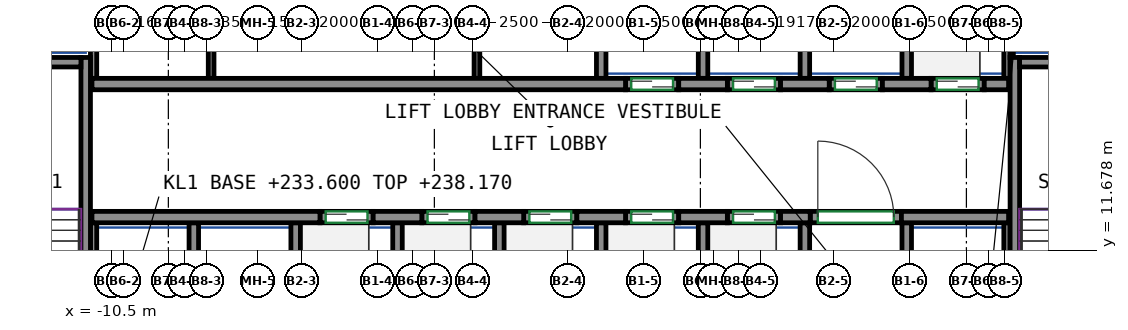
"""IFC4 building model, lengths in metres.
Left out: names, types, materials, properties, quantities, classifications, styles, units other than length and angle.
Written with IfcOpenShell. Run it as: python <this file> out.ifc"""

import sys

from ifc_helpers import new_model, si_unit, direction, frame, frame_2d, origin, place, context, subcontext, project, spatial, rectangle, extrude, source, transform, mapped, element, fill, save


model = new_model("IFC4")
c1 = context("Model", 3, precision=1e-05, world=origin(), true_north=direction((0.0, 1.0)))
c2 = subcontext(c1, "Body", "Model", "MODEL_VIEW")
j1 = project(units=[si_unit("LENGTHUNIT", "METRE"), si_unit("PLANEANGLEUNIT", "RADIAN")], contexts=[c1])
p1 = place(None, origin())
s1 = spatial("IfcSite", under=j1, at=p1, CompositionType="ELEMENT")
p2 = place(p1, origin())
s2 = spatial("IfcBuilding", under=s1, at=p2, CompositionType="ELEMENT")
p3 = place(p2, frame((0.0, 0.0, 233.6)))
s3 = spatial("IfcBuildingStorey", under=s2, at=p3, CompositionType="ELEMENT", Elevation=233.6)
m1 = source(origin(), c2, "Body", "SweptSolid", [
    extrude(rectangle(XDim=7.75, YDim=0.25, at=frame_2d((3.875, 0.0))), origin(), (0.0, 0.0, 1.0), 5.12),
])
p4 = place(p3, frame((-11.175, 9.0, 0.0), z_axis=(0.0, 0.0, 1.0), x_axis=(0.0, 1.0, 0.0)))
e1 = element("IfcWall", 1, at=p4, inside=s3, PredefinedType="SHEAR", context=c2, shape_type="MappedRepresentation", body=[
    mapped(m1, transform((0.0, 0.0, 0.0))),
])
m2 = source(origin(), c2, "Body", "SweptSolid", [
    extrude(rectangle(XDim=3.7, YDim=0.25, at=frame_2d((1.85, 0.0))), origin(), (0.0, 0.0, 1.0), 5.12),
])
p5 = place(p3, frame((-15.0, 16.625, 0.0), z_axis=(0.0, 0.0, 1.0), x_axis=(1.0, 0.0, 0.0)))
e2 = element("IfcWall", 2, at=p5, inside=s3, PredefinedType="SHEAR", context=c2, shape_type="MappedRepresentation", body=[
    mapped(m2, transform((0.0, 0.0, 0.0))),
])
p6 = place(p3, frame((13.275, 9.0, 0.0), z_axis=(0.0, 0.0, 1.0), x_axis=(0.0, 1.0, 0.0)))
e3 = element("IfcWall", 3, at=p6, inside=s3, PredefinedType="SHEAR", context=c2, shape_type="MappedRepresentation", body=[
    mapped(m1, transform((0.0, 0.0, 0.0))),
])
m3 = source(origin(), c2, "Body", "SweptSolid", [
    extrude(rectangle(XDim=3.7, YDim=0.25, at=frame_2d((1.85, 0.0))), origin(), (0.0, 0.0, 1.0), 5.12),
])
p7 = place(p3, frame((13.4, 16.625, 0.0), z_axis=(0.0, 0.0, 1.0), x_axis=(1.0, 0.0, 0.0)))
e4 = element("IfcWall", 4, at=p7, inside=s3, PredefinedType="SHEAR", context=c2, shape_type="MappedRepresentation", body=[
    mapped(m3, transform((0.0, 0.0, 0.0))),
])
m4 = source(origin(), c2, "Body", "SweptSolid", [
    extrude(rectangle(XDim=6.0, YDim=0.3, at=frame_2d((3.0, 0.0))), origin(), (0.0, 0.0, 1.0), 5.12),
])
p8 = place(p3, frame((-11.01, 12.55, 0.0), z_axis=(0.0, 0.0, 1.0), x_axis=(1.0, 0.0, 0.0)))
e5 = element("IfcWall", 5, at=p8, inside=s3, PredefinedType="SHEAR", context=c2, shape_type="MappedRepresentation", body=[
    mapped(m4, transform((0.0, 0.0, 0.0))),
])
m5 = source(origin(), c2, "Body", "SweptSolid", [
    extrude(rectangle(XDim=1.28, YDim=0.3, at=frame_2d((0.64, 0.0))), origin(), (0.0, 0.0, 1.0), 5.12),
])
for number, where, z_axis, x_axis in (
    (6, (-3.61, 12.55, 0.0), (0.0, 0.0, 1.0), (1.0, 0.0, 0.0)),
    (7, (-0.93, 12.55, 0.0), (0.0, 0.0, 1.0), (1.0, 0.0, 0.0)),
    (8, (1.75, 12.55, 0.0), (0.0, 0.0, 1.0), (1.0, 0.0, 0.0)),
    (9, (4.43, 12.55, 0.0), (0.0, 0.0, 1.0), (1.0, 0.0, 0.0)),
):
    element("IfcWall", number, at=place(p3, frame(where, z_axis=z_axis, x_axis=x_axis)), inside=s3, PredefinedType="SHEAR", context=c2, shape_type="MappedRepresentation", body=[
        mapped(m5, transform((0.0, 0.0, 0.0))),
    ])
m6 = source(origin(), c2, "Body", "SweptSolid", [
    extrude(rectangle(XDim=0.78, YDim=0.3, at=frame_2d((0.39, 0.0))), origin(), (0.0, 0.0, 1.0), 5.12),
])
p9 = place(p3, frame((7.11, 12.55, 0.0), z_axis=(0.0, 0.0, 1.0), x_axis=(1.0, 0.0, 0.0)))
e10 = element("IfcWall", 10, at=p9, inside=s3, PredefinedType="SHEAR", context=c2, shape_type="MappedRepresentation", body=[
    mapped(m6, transform((0.0, 0.0, 0.0))),
])
m7 = source(origin(), c2, "Body", "SweptSolid", [
    extrude(rectangle(XDim=2.82, YDim=0.3, at=frame_2d((1.41, 0.0))), origin(), (0.0, 0.0, 1.0), 5.12),
])
p10 = place(p3, frame((10.29, 12.55, 0.0), z_axis=(0.0, 0.0, 1.0), x_axis=(1.0, 0.0, 0.0)))
e11 = element("IfcWall", 11, at=p10, inside=s3, PredefinedType="SHEAR", context=c2, shape_type="MappedRepresentation", body=[
    mapped(m7, transform((0.0, 0.0, 0.0))),
])
m8 = source(origin(), c2, "Body", "SweptSolid", [
    extrude(rectangle(XDim=14.04, YDim=0.3, at=frame_2d((7.02, 0.0))), origin(), (0.0, 0.0, 1.0), 5.12),
])
p11 = place(p3, frame((-11.01, 16.05, 0.0), z_axis=(0.0, 0.0, 1.0), x_axis=(1.0, 0.0, 0.0)))
e12 = element("IfcWall", 12, at=p11, inside=s3, PredefinedType="SHEAR", context=c2, shape_type="MappedRepresentation", body=[
    mapped(m8, transform((0.0, 0.0, 0.0))),
])
p12 = place(p3, frame((4.43, 16.05, 0.0), z_axis=(0.0, 0.0, 1.0), x_axis=(1.0, 0.0, 0.0)))
e13 = element("IfcWall", 13, at=p12, inside=s3, PredefinedType="SHEAR", context=c2, shape_type="MappedRepresentation", body=[
    mapped(m5, transform((0.0, 0.0, 0.0))),
])
m9 = source(origin(), c2, "Body", "SweptSolid", [
    extrude(rectangle(XDim=1.28, YDim=0.3, at=frame_2d((0.64, 0.0))), origin(), (0.0, 0.0, 1.0), 5.12),
])
p13 = place(p3, frame((7.11, 16.05, 0.0), z_axis=(0.0, 0.0, 1.0), x_axis=(1.0, 0.0, 0.0)))
e14 = element("IfcWall", 14, at=p13, inside=s3, PredefinedType="SHEAR", context=c2, shape_type="MappedRepresentation", body=[
    mapped(m9, transform((0.0, 0.0, 0.0))),
])
p14 = place(p3, frame((9.79, 16.05, 0.0), z_axis=(0.0, 0.0, 1.0), x_axis=(1.0, 0.0, 0.0)))
e15 = element("IfcWall", 15, at=p14, inside=s3, PredefinedType="SHEAR", context=c2, shape_type="MappedRepresentation", body=[
    mapped(m5, transform((0.0, 0.0, 0.0))),
])
m10 = source(origin(), c2, "Body", "SweptSolid", [
    extrude(rectangle(XDim=0.64, YDim=0.3, at=frame_2d((0.32, 0.0))), origin(), (0.0, 0.0, 1.0), 5.12),
])
p15 = place(p3, frame((12.47, 16.05, 0.0), z_axis=(0.0, 0.0, 1.0), x_axis=(1.0, 0.0, 0.0)))
e16 = element("IfcWall", 16, at=p15, inside=s3, PredefinedType="SHEAR", context=c2, shape_type="MappedRepresentation", body=[
    mapped(m10, transform((0.0, 0.0, 0.0))),
])
m11 = source(origin(), c2, "Body", "SweptSolid", [
    extrude(rectangle(XDim=1.4, YDim=0.3, at=frame_2d((0.7, 0.0))), origin(), (0.0, 0.0, 1.0), 5.12),
])
p16 = place(p3, frame((-5.01, 12.55, 0.0), z_axis=(0.0, 0.0, 1.0), x_axis=(1.0, 0.0, 0.0)))
e17 = element("IfcWall", 17, at=p16, inside=s3, PredefinedType="PARTITIONING", context=c2, shape_type="MappedRepresentation", body=[
    mapped(m11, transform((0.0, 0.0, 0.0))),
])
p17 = place(p16, frame((0.15, 0.0, 0.0)))
e18 = element("IfcOpeningElement", 18, at=p17, cuts=e17, PredefinedType="OPENING", context=c2, shape_type="SweptSolid", body=[
    extrude(rectangle(XDim=1.1, YDim=2.1, at=frame_2d((0.55, 1.05))), frame((0.0, 0.16, 0.0), z_axis=(0.0, -1.0, 0.0), x_axis=(1.0, 0.0, 0.0)), (0.0, 0.0, 1.0), 0.32),
])
m12 = source(origin(), c2, "Body", "SweptSolid", [
    extrude(rectangle(XDim=1.4, YDim=0.3, at=frame_2d((0.7, 0.0))), origin(), (0.0, 0.0, 1.0), 5.12),
])
p18 = place(p3, frame((-2.33, 12.55, 0.0), z_axis=(0.0, 0.0, 1.0), x_axis=(1.0, 0.0, 0.0)))
e19 = element("IfcWall", 19, at=p18, inside=s3, PredefinedType="PARTITIONING", context=c2, shape_type="MappedRepresentation", body=[
    mapped(m12, transform((0.0, 0.0, 0.0))),
])
p19 = place(p18, frame((0.15, 0.0, 0.0)))
e20 = element("IfcOpeningElement", 20, at=p19, cuts=e19, PredefinedType="OPENING", context=c2, shape_type="SweptSolid", body=[
    extrude(rectangle(XDim=1.1, YDim=2.1, at=frame_2d((0.55, 1.05))), frame((0.0, 0.16, 0.0), z_axis=(0.0, -1.0, 0.0), x_axis=(1.0, 0.0, 0.0)), (0.0, 0.0, 1.0), 0.32),
])
p20 = place(p3, frame((0.35, 12.55, 0.0), z_axis=(0.0, 0.0, 1.0), x_axis=(1.0, 0.0, 0.0)))
e21 = element("IfcWall", 21, at=p20, inside=s3, PredefinedType="PARTITIONING", context=c2, shape_type="MappedRepresentation", body=[
    mapped(m11, transform((0.0, 0.0, 0.0))),
])
p21 = place(p20, frame((0.15, 0.0, 0.0)))
e22 = element("IfcOpeningElement", 22, at=p21, cuts=e21, PredefinedType="OPENING", context=c2, shape_type="SweptSolid", body=[
    extrude(rectangle(XDim=1.1, YDim=2.1, at=frame_2d((0.55, 1.05))), frame((0.0, 0.16, 0.0), z_axis=(0.0, -1.0, 0.0), x_axis=(1.0, 0.0, 0.0)), (0.0, 0.0, 1.0), 0.32),
])
p22 = place(p3, frame((3.03, 12.55, 0.0), z_axis=(0.0, 0.0, 1.0), x_axis=(1.0, 0.0, 0.0)))
e23 = element("IfcWall", 23, at=p22, inside=s3, PredefinedType="PARTITIONING", context=c2, shape_type="MappedRepresentation", body=[
    mapped(m11, transform((0.0, 0.0, 0.0))),
])
p23 = place(p22, frame((0.15, 0.0, 0.0)))
e24 = element("IfcOpeningElement", 24, at=p23, cuts=e23, PredefinedType="OPENING", context=c2, shape_type="SweptSolid", body=[
    extrude(rectangle(XDim=1.1, YDim=2.1, at=frame_2d((0.55, 1.05))), frame((0.0, 0.16, 0.0), z_axis=(0.0, -1.0, 0.0), x_axis=(1.0, 0.0, 0.0)), (0.0, 0.0, 1.0), 0.32),
])
p24 = place(p3, frame((5.71, 12.55, 0.0), z_axis=(0.0, 0.0, 1.0), x_axis=(1.0, 0.0, 0.0)))
e25 = element("IfcWall", 25, at=p24, inside=s3, PredefinedType="PARTITIONING", context=c2, shape_type="MappedRepresentation", body=[
    mapped(m12, transform((0.0, 0.0, 0.0))),
])
p25 = place(p24, frame((0.15, 0.0, 0.0)))
e26 = element("IfcOpeningElement", 26, at=p25, cuts=e25, PredefinedType="OPENING", context=c2, shape_type="SweptSolid", body=[
    extrude(rectangle(XDim=1.1, YDim=2.1, at=frame_2d((0.55, 1.05))), frame((0.0, 0.16, 0.0), z_axis=(0.0, -1.0, 0.0), x_axis=(1.0, 0.0, 0.0)), (0.0, 0.0, 1.0), 0.32),
])
p26 = place(p3, frame((11.07, 16.05, 0.0), z_axis=(0.0, 0.0, 1.0), x_axis=(1.0, 0.0, 0.0)))
e27 = element("IfcWall", 27, at=p26, inside=s3, PredefinedType="PARTITIONING", context=c2, shape_type="MappedRepresentation", body=[
    mapped(m11, transform((0.0, 0.0, 0.0))),
])
p27 = place(p26, frame((0.15, 0.0, 0.0)))
e28 = element("IfcOpeningElement", 28, at=p27, cuts=e27, PredefinedType="OPENING", context=c2, shape_type="SweptSolid", body=[
    extrude(rectangle(XDim=1.1, YDim=2.1, at=frame_2d((0.55, 1.05))), frame((0.0, 0.16, 0.0), z_axis=(0.0, -1.0, 0.0), x_axis=(1.0, 0.0, 0.0)), (0.0, 0.0, 1.0), 0.32),
])
m13 = source(origin(), c2, "Body", "SweptSolid", [
    extrude(rectangle(XDim=2.4, YDim=0.3, at=frame_2d((1.2, 0.0))), origin(), (0.0, 0.0, 1.0), 5.12),
])
p28 = place(p3, frame((7.89, 12.55, 0.0), z_axis=(0.0, 0.0, 1.0), x_axis=(1.0, 0.0, 0.0)))
e29 = element("IfcWall", 29, at=p28, inside=s3, PredefinedType="PARTITIONING", context=c2, shape_type="MappedRepresentation", body=[
    mapped(m13, transform((0.0, 0.0, 0.0))),
])
p29 = place(p28, frame((0.2, 0.0, 0.0)))
e30 = element("IfcOpeningElement", 30, at=p29, cuts=e29, PredefinedType="OPENING", context=c2, shape_type="SweptSolid", body=[
    extrude(rectangle(XDim=2.0, YDim=2.1, at=frame_2d((1.0, 1.05))), frame((0.0, 0.16, 0.0), z_axis=(0.0, -1.0, 0.0), x_axis=(1.0, 0.0, 0.0)), (0.0, 0.0, 1.0), 0.32),
])
p30 = place(p3, frame((3.03, 16.05, 0.0), z_axis=(0.0, 0.0, 1.0), x_axis=(1.0, 0.0, 0.0)))
e31 = element("IfcWall", 31, at=p30, inside=s3, PredefinedType="PARTITIONING", context=c2, shape_type="MappedRepresentation", body=[
    mapped(m11, transform((0.0, 0.0, 0.0))),
])
p31 = place(p30, frame((0.15, 0.0, 0.0)))
e32 = element("IfcOpeningElement", 32, at=p31, cuts=e31, PredefinedType="OPENING", context=c2, shape_type="SweptSolid", body=[
    extrude(rectangle(XDim=1.1, YDim=2.1, at=frame_2d((0.55, 1.05))), frame((0.0, 0.16, 0.0), z_axis=(0.0, -1.0, 0.0), x_axis=(1.0, 0.0, 0.0)), (0.0, 0.0, 1.0), 0.32),
])
p32 = place(p3, frame((5.71, 16.05, 0.0), z_axis=(0.0, 0.0, 1.0), x_axis=(1.0, 0.0, 0.0)))
e33 = element("IfcWall", 33, at=p32, inside=s3, PredefinedType="PARTITIONING", context=c2, shape_type="MappedRepresentation", body=[
    mapped(m12, transform((0.0, 0.0, 0.0))),
])
p33 = place(p32, frame((0.15, 0.0, 0.0)))
e34 = element("IfcOpeningElement", 34, at=p33, cuts=e33, PredefinedType="OPENING", context=c2, shape_type="SweptSolid", body=[
    extrude(rectangle(XDim=1.1, YDim=2.1, at=frame_2d((0.55, 1.05))), frame((0.0, 0.16, 0.0), z_axis=(0.0, -1.0, 0.0), x_axis=(1.0, 0.0, 0.0)), (0.0, 0.0, 1.0), 0.32),
])
p34 = place(p3, frame((8.39, 16.05, 0.0), z_axis=(0.0, 0.0, 1.0), x_axis=(1.0, 0.0, 0.0)))
e35 = element("IfcWall", 35, at=p34, inside=s3, PredefinedType="PARTITIONING", context=c2, shape_type="MappedRepresentation", body=[
    mapped(m12, transform((0.0, 0.0, 0.0))),
])
p35 = place(p34, frame((0.15, 0.0, 0.0)))
e36 = element("IfcOpeningElement", 36, at=p35, cuts=e35, PredefinedType="OPENING", context=c2, shape_type="SweptSolid", body=[
    extrude(rectangle(XDim=1.1, YDim=2.1, at=frame_2d((0.55, 1.05))), frame((0.0, 0.16, 0.0), z_axis=(0.0, -1.0, 0.0), x_axis=(1.0, 0.0, 0.0)), (0.0, 0.0, 1.0), 0.32),
])
m14 = source(origin(), c2, "Body", "SweptSolid", [
    extrude(rectangle(XDim=3.275, YDim=0.165, at=frame_2d((1.638, 0.0))), origin(), (0.0, 0.0, 1.0), 5.12),
])
p36 = place(p3, frame((13.067, 16.2, 0.0), z_axis=(0.0, 0.0, 1.0), x_axis=(0.0, 1.0, 0.0)))
e37 = element("IfcWall", 37, at=p36, inside=s3, PredefinedType="PARTITIONING", context=c2, shape_type="MappedRepresentation", body=[
    mapped(m14, transform((0.0, 0.0, 0.0))),
])
m15 = source(origin(), c2, "Body", "SweptSolid", [
    extrude(rectangle(XDim=4.8, YDim=0.165, at=frame_2d((2.4, 0.0))), origin(), (0.0, 0.0, 1.0), 5.12),
])
p37 = place(p3, frame((-10.968, 16.2, 0.0), z_axis=(0.0, 0.0, 1.0), x_axis=(0.0, 1.0, 0.0)))
e38 = element("IfcWall", 38, at=p37, inside=s3, PredefinedType="PARTITIONING", context=c2, shape_type="MappedRepresentation", body=[
    mapped(m15, transform((0.0, 0.0, 0.0))),
])
m16 = source(origin(), c2, "Body", "SweptSolid", [
    extrude(rectangle(XDim=3.275, YDim=0.25, at=frame_2d((1.638, 0.0))), origin(), (0.0, 0.0, 1.0), 5.12),
])
p38 = place(p3, frame((10.43, 16.2, 0.0), z_axis=(0.0, 0.0, 1.0), x_axis=(0.0, 1.0, 0.0)))
e39 = element("IfcWall", 39, at=p38, inside=s3, PredefinedType="PARTITIONING", context=c2, shape_type="MappedRepresentation", body=[
    mapped(m16, transform((0.0, 0.0, 0.0))),
])
m17 = source(origin(), c2, "Body", "SweptSolid", [
    extrude(rectangle(XDim=2.725, YDim=0.085, at=frame_2d((1.363, 0.0))), origin(), (0.0, 0.0, 1.0), 5.12),
])
p39 = place(p3, frame((13.192, 16.75, 0.0), z_axis=(0.0, 0.0, 1.0), x_axis=(0.0, 1.0, 0.0)))
e40 = element("IfcWall", 40, at=p39, inside=s3, PredefinedType="PARTITIONING", context=c2, shape_type="MappedRepresentation", body=[
    mapped(m17, transform((0.0, 0.0, 0.0))),
])
for number, where, z_axis, x_axis in (
    (41, (2.39, 16.2, 0.0), (0.0, 0.0, 1.0), (0.0, 1.0, 0.0)),
    (42, (5.07, 16.2, 0.0), (0.0, 0.0, 1.0), (0.0, 1.0, 0.0)),
    (43, (7.75, 16.2, 0.0), (0.0, 0.0, 1.0), (0.0, 1.0, 0.0)),
):
    element("IfcWall", number, at=place(p3, frame(where, z_axis=z_axis, x_axis=x_axis)), inside=s3, PredefinedType="PARTITIONING", context=c2, shape_type="MappedRepresentation", body=[
        mapped(m16, transform((0.0, 0.0, 0.0))),
    ])
m18 = source(origin(), c2, "Body", "SweptSolid", [
    extrude(rectangle(XDim=3.4, YDim=0.25, at=frame_2d((1.7, 0.0))), origin(), (0.0, 0.0, 1.0), 5.12),
])
p40 = place(p3, frame((10.43, 9.0, 0.0), z_axis=(0.0, 0.0, 1.0), x_axis=(0.0, 1.0, 0.0)))
e44 = element("IfcWall", 44, at=p40, inside=s3, PredefinedType="PARTITIONING", context=c2, shape_type="MappedRepresentation", body=[
    mapped(m18, transform((0.0, 0.0, 0.0))),
])
m19 = source(origin(), c2, "Body", "SweptSolid", [
    extrude(rectangle(XDim=3.4, YDim=0.165, at=frame_2d((1.7, 0.0))), origin(), (0.0, 0.0, 1.0), 5.12),
])
p41 = place(p3, frame((13.067, 9.0, 0.0), z_axis=(0.0, 0.0, 1.0), x_axis=(0.0, 1.0, 0.0)))
e45 = element("IfcWall", 45, at=p41, inside=s3, PredefinedType="PARTITIONING", context=c2, shape_type="MappedRepresentation", body=[
    mapped(m19, transform((0.0, 0.0, 0.0))),
])
for number, where, z_axis, x_axis in (
    (46, (2.39, 9.0, 0.0), (0.0, 0.0, 1.0), (0.0, 1.0, 0.0)),
    (47, (5.07, 9.0, 0.0), (0.0, 0.0, 1.0), (0.0, 1.0, 0.0)),
    (48, (7.75, 9.0, 0.0), (0.0, 0.0, 1.0), (0.0, 1.0, 0.0)),
    (49, (-0.29, 9.0, 0.0), (0.0, 0.0, 1.0), (0.0, 1.0, 0.0)),
):
    element("IfcWall", number, at=place(p3, frame(where, z_axis=z_axis, x_axis=x_axis)), inside=s3, PredefinedType="PARTITIONING", context=c2, shape_type="MappedRepresentation", body=[
        mapped(m18, transform((0.0, 0.0, 0.0))),
    ])
p42 = place(p3, frame((-10.968, 9.0, 0.0), z_axis=(0.0, 0.0, 1.0), x_axis=(0.0, 1.0, 0.0)))
e50 = element("IfcWall", 50, at=p42, inside=s3, PredefinedType="PARTITIONING", context=c2, shape_type="MappedRepresentation", body=[
    mapped(m19, transform((0.0, 0.0, 0.0))),
])
for number, where, z_axis, x_axis in (
    (51, (-2.97, 9.0, 0.0), (0.0, 0.0, 1.0), (0.0, 1.0, 0.0)),
    (52, (-5.65, 9.0, 0.0), (0.0, 0.0, 1.0), (0.0, 1.0, 0.0)),
    (53, (-8.33, 9.0, 0.0), (0.0, 0.0, 1.0), (0.0, 1.0, 0.0)),
):
    element("IfcWall", number, at=place(p3, frame(where, z_axis=z_axis, x_axis=x_axis)), inside=s3, PredefinedType="PARTITIONING", context=c2, shape_type="MappedRepresentation", body=[
        mapped(m18, transform((0.0, 0.0, 0.0))),
    ])
m20 = source(origin(), c2, "Body", "SweptSolid", [
    extrude(rectangle(XDim=4.8, YDim=0.15, at=frame_2d((2.4, 0.0))), origin(), (0.0, 0.0, 1.0), 5.12),
])
for number, where, z_axis, x_axis in (
    (54, (-7.875, 16.2, 0.0), (0.0, 0.0, 1.0), (0.0, 1.0, 0.0)),
    (55, (-0.88, 16.2, 0.0), (0.0, 0.0, 1.0), (0.0, 1.0, 0.0)),
):
    element("IfcWall", number, at=place(p3, frame(where, z_axis=z_axis, x_axis=x_axis)), inside=s3, PredefinedType="PARTITIONING", context=c2, shape_type="MappedRepresentation", body=[
        mapped(m20, transform((0.0, 0.0, 0.0))),
    ])
p43 = place(p29, origin())
e56 = element("IfcDoor", 56, at=p43, inside=s3, OperationType="DOUBLE_DOOR_SINGLE_SWING", PredefinedType="DOOR", context=c2, shape_type="SweptSolid", body=[
    extrude(rectangle(XDim=2.0, YDim=2.1, at=frame_2d((1.0, 1.05))), frame((0.0, 0.025, 0.0), z_axis=(0.0, -1.0, 0.0), x_axis=(1.0, 0.0, 0.0)), (0.0, 0.0, 1.0), 0.05),
])
fill(e30, e56)
p44 = place(p17, origin())
e57 = element("IfcDoor", 57, at=p44, inside=s3, OperationType="DOUBLE_DOOR_SLIDING", PredefinedType="DOOR", context=c2, shape_type="SweptSolid", body=[
    extrude(rectangle(XDim=1.1, YDim=2.1, at=frame_2d((0.55, 1.05))), frame((0.0, 0.025, 0.0), z_axis=(0.0, -1.0, 0.0), x_axis=(1.0, 0.0, 0.0)), (0.0, 0.0, 1.0), 0.05),
])
fill(e18, e57)
p45 = place(p19, origin())
e58 = element("IfcDoor", 58, at=p45, inside=s3, OperationType="DOUBLE_DOOR_SLIDING", PredefinedType="DOOR", context=c2, shape_type="SweptSolid", body=[
    extrude(rectangle(XDim=1.1, YDim=2.1, at=frame_2d((0.55, 1.05))), frame((0.0, 0.025, 0.0), z_axis=(0.0, -1.0, 0.0), x_axis=(1.0, 0.0, 0.0)), (0.0, 0.0, 1.0), 0.05),
])
fill(e20, e58)
p46 = place(p21, origin())
e59 = element("IfcDoor", 59, at=p46, inside=s3, OperationType="DOUBLE_DOOR_SLIDING", PredefinedType="DOOR", context=c2, shape_type="SweptSolid", body=[
    extrude(rectangle(XDim=1.1, YDim=2.1, at=frame_2d((0.55, 1.05))), frame((0.0, 0.025, 0.0), z_axis=(0.0, -1.0, 0.0), x_axis=(1.0, 0.0, 0.0)), (0.0, 0.0, 1.0), 0.05),
])
fill(e22, e59)
p47 = place(p23, origin())
e60 = element("IfcDoor", 60, at=p47, inside=s3, OperationType="DOUBLE_DOOR_SLIDING", PredefinedType="DOOR", context=c2, shape_type="SweptSolid", body=[
    extrude(rectangle(XDim=1.1, YDim=2.1, at=frame_2d((0.55, 1.05))), frame((0.0, 0.025, 0.0), z_axis=(0.0, -1.0, 0.0), x_axis=(1.0, 0.0, 0.0)), (0.0, 0.0, 1.0), 0.05),
])
fill(e24, e60)
p48 = place(p25, origin())
e61 = element("IfcDoor", 61, at=p48, inside=s3, OperationType="DOUBLE_DOOR_SLIDING", PredefinedType="DOOR", context=c2, shape_type="SweptSolid", body=[
    extrude(rectangle(XDim=1.1, YDim=2.1, at=frame_2d((0.55, 1.05))), frame((0.0, 0.025, 0.0), z_axis=(0.0, -1.0, 0.0), x_axis=(1.0, 0.0, 0.0)), (0.0, 0.0, 1.0), 0.05),
])
fill(e26, e61)
p49 = place(p27, origin())
e62 = element("IfcDoor", 62, at=p49, inside=s3, OperationType="DOUBLE_DOOR_SLIDING", PredefinedType="DOOR", context=c2, shape_type="SweptSolid", body=[
    extrude(rectangle(XDim=1.1, YDim=2.1, at=frame_2d((0.55, 1.05))), frame((0.0, 0.025, 0.0), z_axis=(0.0, -1.0, 0.0), x_axis=(1.0, 0.0, 0.0)), (0.0, 0.0, 1.0), 0.05),
])
fill(e28, e62)
p50 = place(p31, origin())
e63 = element("IfcDoor", 63, at=p50, inside=s3, OperationType="DOUBLE_DOOR_SLIDING", PredefinedType="DOOR", context=c2, shape_type="SweptSolid", body=[
    extrude(rectangle(XDim=1.1, YDim=2.1, at=frame_2d((0.55, 1.05))), frame((0.0, 0.025, 0.0), z_axis=(0.0, -1.0, 0.0), x_axis=(1.0, 0.0, 0.0)), (0.0, 0.0, 1.0), 0.05),
])
fill(e32, e63)
p51 = place(p33, origin())
e64 = element("IfcDoor", 64, at=p51, inside=s3, OperationType="DOUBLE_DOOR_SLIDING", PredefinedType="DOOR", context=c2, shape_type="SweptSolid", body=[
    extrude(rectangle(XDim=1.1, YDim=2.1, at=frame_2d((0.55, 1.05))), frame((0.0, 0.025, 0.0), z_axis=(0.0, -1.0, 0.0), x_axis=(1.0, 0.0, 0.0)), (0.0, 0.0, 1.0), 0.05),
])
fill(e34, e64)
p52 = place(p35, origin())
e65 = element("IfcDoor", 65, at=p52, inside=s3, OperationType="DOUBLE_DOOR_SLIDING", PredefinedType="DOOR", context=c2, shape_type="SweptSolid", body=[
    extrude(rectangle(XDim=1.1, YDim=2.1, at=frame_2d((0.55, 1.05))), frame((0.0, 0.025, 0.0), z_axis=(0.0, -1.0, 0.0), x_axis=(1.0, 0.0, 0.0)), (0.0, 0.0, 1.0), 0.05),
])
fill(e36, e65)
save(model, sys.argv[1])
